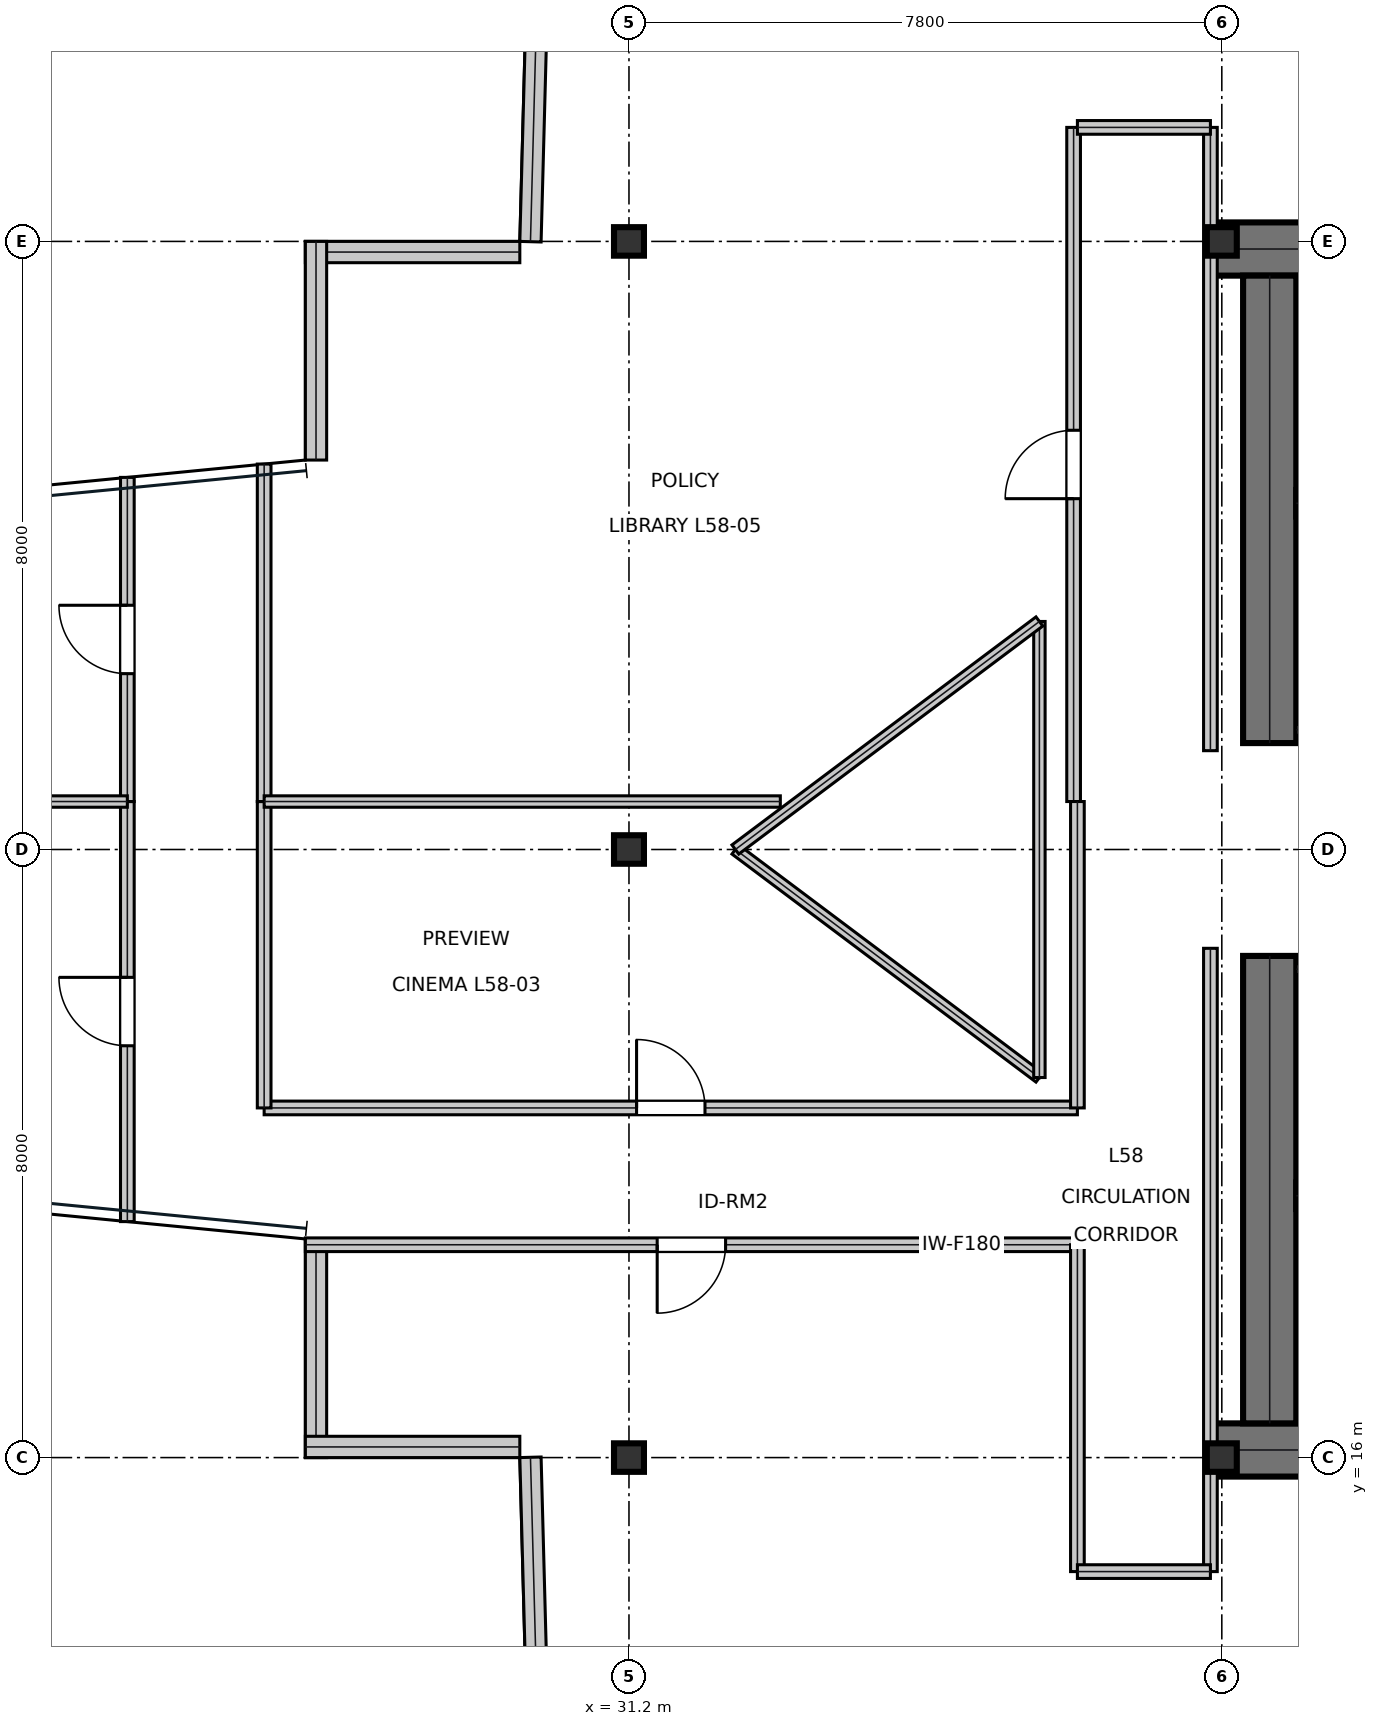
"""IFC4 building model, lengths in metres.
Left out: names, types, materials, properties, quantities, classifications, styles, units other than length and angle.
Written with IfcOpenShell. Run it as: python <this file> out.ifc"""

import sys

from ifc_helpers import new_model, si_unit, direction, frame, frame_2d, origin, origin_2d, place, context, subcontext, project, spatial, rectangle, i_section, extrude, element, fill, save


model = new_model("IFC4")
c1 = context("Model", 3, precision=1e-05, world=origin(), true_north=direction((0.0, 1.0)))
c2 = subcontext(c1, "Body", "Model", "MODEL_VIEW")
j1 = project(units=[si_unit("LENGTHUNIT", "METRE"), si_unit("PLANEANGLEUNIT", "RADIAN")], contexts=[c1])
p1 = place(None, origin())
s1 = spatial("IfcSite", under=j1, at=p1, CompositionType="ELEMENT")
p2 = place(p1, origin())
s2 = spatial("IfcBuilding", under=s1, at=p2, CompositionType="ELEMENT")
p3 = place(p2, frame((0.0, 0.0, 248.55)))
s3 = spatial("IfcBuildingStorey", under=s2, at=p3, CompositionType="ELEMENT", Elevation=248.55)
for number, where, z_axis, x_axis in (
    (1, (38.8, 31.9, 0.0), (0.0, 0.0, 1.0), (1.0, 0.0, 0.0)),
    (2, (38.8, 16.1, 0.0), (0.0, 0.0, 1.0), (1.0, 0.0, 0.0)),
):
    element("IfcWall", number, at=place(p3, frame(where, z_axis=z_axis, x_axis=x_axis)), inside=s3, PredefinedType="SHEAR", context=c2, shape_type="SweptSolid", body=[
        extrude(rectangle(XDim=16.0, YDim=0.7, at=frame_2d((8.0, 0.0))), origin(), (0.0, 0.0, 1.0), 3.79),
    ])
for number, where, z_axis, x_axis in (
    (3, (39.63, 16.45, 0.0), (0.0, 0.0, 1.0), (0.0, 1.0, 0.0)),
    (4, (39.63, 25.4, 0.0), (0.0, 0.0, 1.0), (0.0, 1.0, 0.0)),
):
    element("IfcWall", number, at=place(p3, frame(where, z_axis=z_axis, x_axis=x_axis)), inside=s3, PredefinedType="SHEAR", context=c2, shape_type="SweptSolid", body=[
        extrude(rectangle(XDim=6.15, YDim=0.7, at=frame_2d((3.075, 0.0))), origin(), (0.0, 0.0, 1.0), 3.79),
    ])
p4 = place(p3, frame((39.98, 28.555, 0.0), z_axis=(0.0, 0.0, 1.0), x_axis=(1.0, 0.0, 0.0)))
e5 = element("IfcWall", 5, at=p4, inside=s3, PredefinedType="SHEAR", context=c2, shape_type="SweptSolid", body=[
    extrude(rectangle(XDim=7.71, YDim=0.35, at=frame_2d((3.855, 0.0))), origin(), (0.0, 0.0, 1.0), 3.79),
])
p5 = place(p4, frame((0.25, 0.0, 0.0)))
e6 = element("IfcOpeningElement", 6, at=p5, cuts=e5, PredefinedType="OPENING", context=c2, shape_type="SweptSolid", body=[
    extrude(rectangle(XDim=1.1, YDim=2.15, at=frame_2d((0.55, 1.075))), frame((0.0, 0.185, 0.0), z_axis=(0.0, -1.0, 0.0), x_axis=(1.0, 0.0, 0.0)), (0.0, 0.0, 1.0), 0.37),
])
p6 = place(p3, frame((39.98, 19.445, 0.0), z_axis=(0.0, 0.0, 1.0), x_axis=(1.0, 0.0, 0.0)))
e7 = element("IfcWall", 7, at=p6, inside=s3, PredefinedType="SHEAR", context=c2, shape_type="SweptSolid", body=[
    extrude(rectangle(XDim=7.71, YDim=0.35, at=frame_2d((3.855, 0.0))), origin(), (0.0, 0.0, 1.0), 3.79),
])
p7 = place(p6, frame((0.25, 0.0, 0.0)))
e8 = element("IfcOpeningElement", 8, at=p7, cuts=e7, PredefinedType="OPENING", context=c2, shape_type="SweptSolid", body=[
    extrude(rectangle(XDim=1.1, YDim=2.15, at=frame_2d((0.55, 1.075))), frame((0.0, 0.185, 0.0), z_axis=(0.0, -1.0, 0.0), x_axis=(1.0, 0.0, 0.0)), (0.0, 0.0, 1.0), 0.37),
])
for number, where, z_axis, x_axis in (
    (9, (31.2, 16.0, 0.0), (0.0, 0.0, 1.0), (1.0, 0.0, 0.0)),
    (10, (31.2, 24.0, 0.0), (0.0, 0.0, 1.0), (1.0, 0.0, 0.0)),
    (11, (31.2, 32.0, 0.0), (0.0, 0.0, 1.0), (1.0, 0.0, 0.0)),
    (12, (39.0, 16.0, 0.0), (0.0, 0.0, 1.0), (1.0, 0.0, 0.0)),
    (13, (39.0, 32.0, 0.0), (0.0, 0.0, 1.0), (1.0, 0.0, 0.0)),
):
    element("IfcColumn", number, at=place(p3, frame(where, z_axis=z_axis, x_axis=x_axis)), inside=s3, PredefinedType="COLUMN", context=c2, shape_type="SweptSolid", body=[
        extrude(i_section(OverallWidth=0.394, OverallDepth=0.375, WebThickness=0.017, FlangeThickness=0.028, at=origin_2d()), origin(), (0.0, 0.0, 1.0), 4.044),
    ])
p8 = place(p3, frame((30.083, 38.723, 0.0), z_axis=(0.0, 0.0, 1.0), x_axis=(-0.026702629768, -0.999643421208, 0.0)))
e14 = element("IfcWall", 14, at=p8, inside=s3, PredefinedType="STANDARD", context=c2, shape_type="SweptSolid", body=[
    extrude(rectangle(XDim=6.729, YDim=0.28, at=frame_2d((3.365, 0.0))), origin(), (0.0, 0.0, 1.0), 3.79),
])
p9 = place(p3, frame((29.764, 31.86, 0.0), z_axis=(0.0, 0.0, 1.0), x_axis=(-1.0, 0.0, 0.0)))
e15 = element("IfcWall", 15, at=p9, inside=s3, PredefinedType="STANDARD", context=c2, shape_type="SweptSolid", body=[
    extrude(rectangle(XDim=2.822, YDim=0.28, at=frame_2d((1.411, 0.0))), origin(), (0.0, 0.0, 1.0), 3.79),
])
for number, where, z_axis, x_axis in (
    (16, (27.083, 32.0, 0.0), (0.0, 0.0, 1.0), (0.0, -1.0, 0.0)),
    (17, (27.083, 18.876, 0.0), (0.0, 0.0, 1.0), (0.0, -1.0, 0.0)),
):
    element("IfcWall", number, at=place(p3, frame(where, z_axis=z_axis, x_axis=x_axis)), inside=s3, PredefinedType="STANDARD", context=c2, shape_type="SweptSolid", body=[
        extrude(rectangle(XDim=2.876, YDim=0.28, at=frame_2d((1.438, 0.0))), origin(), (0.0, 0.0, 1.0), 3.319),
    ])
p10 = place(p3, frame((26.942, 16.14, 0.0), z_axis=(0.0, 0.0, 1.0), x_axis=(1.0, 0.0, 0.0)))
e18 = element("IfcWall", 18, at=p10, inside=s3, PredefinedType="STANDARD", context=c2, shape_type="SweptSolid", body=[
    extrude(rectangle(XDim=2.822, YDim=0.28, at=frame_2d((1.411, 0.0))), origin(), (0.0, 0.0, 1.0), 3.79),
])
p11 = place(p3, frame((29.904, 16.004, 0.0), z_axis=(0.0, 0.0, 1.0), x_axis=(0.026702629768, -0.999643421208, 0.0)))
e19 = element("IfcWall", 19, at=p11, inside=s3, PredefinedType="STANDARD", context=c2, shape_type="SweptSolid", body=[
    extrude(rectangle(XDim=6.729, YDim=0.28, at=frame_2d((3.365, 0.0))), origin(), (0.0, 0.0, 1.0), 3.79),
])
p12 = place(p3, frame((39.98, 25.575, 0.0), z_axis=(0.0, 0.0, 1.0), x_axis=(1.0, 0.0, 0.0)))
e20 = element("IfcWall", 20, at=p12, inside=s3, PredefinedType="PARTITIONING", context=c2, shape_type="SweptSolid", body=[
    extrude(rectangle(XDim=5.9, YDim=0.15, at=frame_2d((2.95, 0.0))), origin(), (0.0, 0.0, 1.0), 3.79),
])
p13 = place(p12, frame((2.35, 0.0, 0.0)))
e21 = element("IfcOpeningElement", 21, at=p13, cuts=e20, PredefinedType="OPENING", context=c2, shape_type="SweptSolid", body=[
    extrude(rectangle(XDim=1.05, YDim=2.15, at=frame_2d((0.525, 1.075))), frame((0.0, 0.085, 0.0), z_axis=(0.0, -1.0, 0.0), x_axis=(1.0, 0.0, 0.0)), (0.0, 0.0, 1.0), 0.17),
])
p14 = place(p3, frame((39.98, 22.425, 0.0), z_axis=(0.0, 0.0, 1.0), x_axis=(1.0, 0.0, 0.0)))
e22 = element("IfcWall", 22, at=p14, inside=s3, PredefinedType="PARTITIONING", context=c2, shape_type="SweptSolid", body=[
    extrude(rectangle(XDim=5.9, YDim=0.15, at=frame_2d((2.95, 0.0))), origin(), (0.0, 0.0, 1.0), 3.79),
])
p15 = place(p14, frame((2.35, 0.0, 0.0)))
e23 = element("IfcOpeningElement", 23, at=p15, cuts=e22, PredefinedType="OPENING", context=c2, shape_type="SweptSolid", body=[
    extrude(rectangle(XDim=1.05, YDim=2.15, at=frame_2d((0.525, 1.075))), frame((0.0, 0.085, 0.0), z_axis=(0.0, -1.0, 0.0), x_axis=(1.0, 0.0, 0.0)), (0.0, 0.0, 1.0), 0.17),
])
p16 = place(p3, frame((26.942, 18.8, 0.0), z_axis=(0.0, 0.0, 1.0), x_axis=(1.0, 0.0, 0.0)))
e24 = element("IfcWall", 24, at=p16, inside=s3, PredefinedType="SOLIDWALL", context=c2, shape_type="SweptSolid", body=[
    extrude(rectangle(XDim=10.158, YDim=0.18, at=frame_2d((5.079, 0.0))), origin(), (0.0, 0.0, 1.0), 3.241),
])
p17 = place(p16, frame((4.629, 0.0, 0.0)))
e25 = element("IfcOpeningElement", 25, at=p17, cuts=e24, PredefinedType="OPENING", context=c2, shape_type="SweptSolid", body=[
    extrude(rectangle(XDim=0.9, YDim=2.15, at=frame_2d((0.45, 1.075))), frame((0.0, 0.1, 0.0), z_axis=(0.0, -1.0, 0.0), x_axis=(1.0, 0.0, 0.0)), (0.0, 0.0, 1.0), 0.2),
])
p18 = place(p3, frame((24.6, 19.104, 0.0), z_axis=(0.0, 0.0, 1.0), x_axis=(0.0, 1.0, 0.0)))
e26 = element("IfcWall", 26, at=p18, inside=s3, PredefinedType="SOLIDWALL", context=c2, shape_type="SweptSolid", body=[
    extrude(rectangle(XDim=5.527, YDim=0.18, at=frame_2d((2.763, 0.0))), origin(), (0.0, 0.0, 1.0), 3.241),
])
p19 = place(p18, frame((2.313, 0.0, 0.0)))
e27 = element("IfcOpeningElement", 27, at=p19, cuts=e26, PredefinedType="OPENING", context=c2, shape_type="SweptSolid", body=[
    extrude(rectangle(XDim=0.9, YDim=2.15, at=frame_2d((0.45, 1.075))), frame((0.0, 0.1, 0.0), z_axis=(0.0, -1.0, 0.0), x_axis=(1.0, 0.0, 0.0)), (0.0, 0.0, 1.0), 0.2),
])
p20 = place(p3, frame((26.4, 20.6, 0.0), z_axis=(0.0, 0.0, 1.0), x_axis=(1.0, 0.0, 0.0)))
e28 = element("IfcWall", 28, at=p20, inside=s3, PredefinedType="SOLIDWALL", context=c2, shape_type="SweptSolid", body=[
    extrude(rectangle(XDim=10.7, YDim=0.18, at=frame_2d((5.35, 0.0))), origin(), (0.0, 0.0, 1.0), 3.241),
])
p21 = place(p20, frame((4.9, 0.0, 0.0)))
e29 = element("IfcOpeningElement", 29, at=p21, cuts=e28, PredefinedType="OPENING", context=c2, shape_type="SweptSolid", body=[
    extrude(rectangle(XDim=0.9, YDim=2.15, at=frame_2d((0.45, 1.075))), frame((0.0, 0.1, 0.0), z_axis=(0.0, -1.0, 0.0), x_axis=(1.0, 0.0, 0.0)), (0.0, 0.0, 1.0), 0.2),
])
p22 = place(p3, frame((24.6, 24.631, 0.0), z_axis=(0.0, 0.0, 1.0), x_axis=(0.0, 1.0, 0.0)))
e30 = element("IfcWall", 30, at=p22, inside=s3, PredefinedType="SOLIDWALL", context=c2, shape_type="SweptSolid", body=[
    extrude(rectangle(XDim=4.264, YDim=0.18, at=frame_2d((2.132, 0.0))), origin(), (0.0, 0.0, 1.0), 3.241),
])
p23 = place(p22, frame((1.682, 0.0, 0.0)))
e31 = element("IfcOpeningElement", 31, at=p23, cuts=e30, PredefinedType="OPENING", context=c2, shape_type="SweptSolid", body=[
    extrude(rectangle(XDim=0.9, YDim=2.15, at=frame_2d((0.45, 1.075))), frame((0.0, 0.1, 0.0), z_axis=(0.0, -1.0, 0.0), x_axis=(1.0, 0.0, 0.0)), (0.0, 0.0, 1.0), 0.2),
])
p24 = place(p3, frame((37.05, 24.631, 0.0), z_axis=(0.0, 0.0, 1.0), x_axis=(0.0, 1.0, 0.0)))
e32 = element("IfcWall", 32, at=p24, inside=s3, PredefinedType="SOLIDWALL", context=c2, shape_type="SweptSolid", body=[
    extrude(rectangle(XDim=8.869, YDim=0.18, at=frame_2d((4.435, 0.0))), origin(), (0.0, 0.0, 1.0), 3.241),
])
p25 = place(p24, frame((3.985, 0.0, 0.0)))
e33 = element("IfcOpeningElement", 33, at=p25, cuts=e32, PredefinedType="OPENING", context=c2, shape_type="SweptSolid", body=[
    extrude(rectangle(XDim=0.9, YDim=2.15, at=frame_2d((0.45, 1.075))), frame((0.0, 0.1, 0.0), z_axis=(0.0, -1.0, 0.0), x_axis=(1.0, 0.0, 0.0)), (0.0, 0.0, 1.0), 0.2),
])
p26 = place(p3, frame((38.85, 14.5, 0.0), z_axis=(0.0, 0.0, 1.0), x_axis=(0.0, 1.0, 0.0)))
e34 = element("IfcWall", 34, at=p26, inside=s3, PredefinedType="SOLIDWALL", context=c2, shape_type="SweptSolid", body=[
    extrude(rectangle(XDim=8.2, YDim=0.18, at=frame_2d((4.1, 0.0))), origin(), (0.0, 0.0, 1.0), 3.241),
])
p27 = place(p3, frame((37.1, 14.5, 0.0), z_axis=(0.0, 0.0, 1.0), x_axis=(0.0, 1.0, 0.0)))
e35 = element("IfcWall", 35, at=p27, inside=s3, PredefinedType="SOLIDWALL", context=c2, shape_type="SweptSolid", body=[
    extrude(rectangle(XDim=4.3, YDim=0.18, at=frame_2d((2.15, 0.0))), origin(), (0.0, 0.0, 1.0), 3.241),
])
p28 = place(p3, frame((37.1, 14.5, 0.0), z_axis=(0.0, 0.0, 1.0), x_axis=(1.0, 0.0, 0.0)))
e36 = element("IfcWall", 36, at=p28, inside=s3, PredefinedType="SOLIDWALL", context=c2, shape_type="SweptSolid", body=[
    extrude(rectangle(XDim=1.75, YDim=0.18, at=frame_2d((0.875, 0.0))), origin(), (0.0, 0.0, 1.0), 3.241),
])
p29 = place(p3, frame((26.4, 20.6, 0.0), z_axis=(0.0, 0.0, 1.0), x_axis=(0.0, 1.0, 0.0)))
e37 = element("IfcWall", 37, at=p29, inside=s3, PredefinedType="SOLIDWALL", context=c2, shape_type="SweptSolid", body=[
    extrude(rectangle(XDim=4.031, YDim=0.18, at=frame_2d((2.016, 0.0))), origin(), (0.0, 0.0, 1.0), 3.241),
])
p30 = place(p3, frame((37.1, 20.6, 0.0), z_axis=(0.0, 0.0, 1.0), x_axis=(0.0, 1.0, 0.0)))
e38 = element("IfcWall", 38, at=p30, inside=s3, PredefinedType="SOLIDWALL", context=c2, shape_type="SweptSolid", body=[
    extrude(rectangle(XDim=4.031, YDim=0.18, at=frame_2d((2.016, 0.0))), origin(), (0.0, 0.0, 1.0), 3.79),
])
p31 = place(p3, frame((38.85, 25.3, 0.0), z_axis=(0.0, 0.0, 1.0), x_axis=(0.0, 1.0, 0.0)))
e39 = element("IfcWall", 39, at=p31, inside=s3, PredefinedType="SOLIDWALL", context=c2, shape_type="SweptSolid", body=[
    extrude(rectangle(XDim=8.2, YDim=0.18, at=frame_2d((4.1, 0.0))), origin(), (0.0, 0.0, 1.0), 3.241),
])
p32 = place(p3, frame((26.4, 24.631, 0.0), z_axis=(0.0, 0.0, 1.0), x_axis=(0.0, 1.0, 0.0)))
e40 = element("IfcWall", 40, at=p32, inside=s3, PredefinedType="SOLIDWALL", context=c2, shape_type="SweptSolid", body=[
    extrude(rectangle(XDim=4.44, YDim=0.18, at=frame_2d((2.22, 0.0))), origin(), (0.0, 0.0, 1.0), 3.241),
])
p33 = place(p3, frame((37.1, 33.5, 0.0), z_axis=(0.0, 0.0, 1.0), x_axis=(1.0, 0.0, 0.0)))
e41 = element("IfcWall", 41, at=p33, inside=s3, PredefinedType="SOLIDWALL", context=c2, shape_type="SweptSolid", body=[
    extrude(rectangle(XDim=1.75, YDim=0.18, at=frame_2d((0.875, 0.0))), origin(), (0.0, 0.0, 1.0), 3.241),
])
p34 = place(p3, frame((14.791, 24.631, 0.0), z_axis=(0.0, 0.0, 1.0), x_axis=(1.0, 0.0, 0.0)))
e42 = element("IfcWall", 42, at=p34, inside=s3, PredefinedType="MOVABLE", context=c2, shape_type="SweptSolid", body=[
    extrude(rectangle(XDim=9.809, YDim=0.15, at=frame_2d((4.905, 0.0))), origin(), (0.0, 0.0, 1.0), 3.468),
])
p35 = place(p3, frame((26.4, 24.631, 0.0), z_axis=(0.0, 0.0, 1.0), x_axis=(1.0, 0.0, 0.0)))
e43 = element("IfcWall", 43, at=p35, inside=s3, PredefinedType="MOVABLE", context=c2, shape_type="SweptSolid", body=[
    extrude(rectangle(XDim=6.792, YDim=0.15, at=frame_2d((3.396, 0.0))), origin(), (0.0, 0.0, 1.0), 3.241),
])
p36 = place(p3, frame((32.6, 24.0, 0.0), z_axis=(0.0, 0.0, 1.0), x_axis=(0.8, -0.6, 0.0)))
e44 = element("IfcWall", 44, at=p36, inside=s3, PredefinedType="MOVABLE", context=c2, shape_type="SweptSolid", body=[
    extrude(rectangle(XDim=5.0, YDim=0.15, at=frame_2d((2.5, 0.0))), origin(), (0.0, 0.0, 1.0), 3.79),
])
p37 = place(p3, frame((36.6, 21.0, 0.0), z_axis=(0.0, 0.0, 1.0), x_axis=(0.0, 1.0, 0.0)))
e45 = element("IfcWall", 45, at=p37, inside=s3, PredefinedType="MOVABLE", context=c2, shape_type="SweptSolid", body=[
    extrude(rectangle(XDim=6.0, YDim=0.15, at=frame_2d((3.0, 0.0))), origin(), (0.0, 0.0, 1.0), 3.79),
])
p38 = place(p3, frame((36.6, 27.0, 0.0), z_axis=(0.0, 0.0, 1.0), x_axis=(-0.8, -0.6, 0.0)))
e46 = element("IfcWall", 46, at=p38, inside=s3, PredefinedType="MOVABLE", context=c2, shape_type="SweptSolid", body=[
    extrude(rectangle(XDim=5.0, YDim=0.15, at=frame_2d((2.5, 0.0))), origin(), (0.0, 0.0, 1.0), 3.79),
])
p39 = place(p17, frame((0.9, 0.0, 0.0), z_axis=(0.0, 0.0, 1.0), x_axis=(-1.0, 0.0, 0.0)))
e47 = element("IfcDoor", 47, at=p39, inside=s3, OperationType="SINGLE_SWING_RIGHT", PredefinedType="DOOR", context=c2, shape_type="SweptSolid", body=[
    extrude(rectangle(XDim=0.9, YDim=2.15, at=frame_2d((0.45, 1.075))), frame((0.0, 0.025, 0.0), z_axis=(0.0, -1.0, 0.0), x_axis=(1.0, 0.0, 0.0)), (0.0, 0.0, 1.0), 0.05),
])
fill(e25, e47)
p40 = place(p19, origin())
e48 = element("IfcDoor", 48, at=p40, inside=s3, OperationType="SINGLE_SWING_RIGHT", PredefinedType="DOOR", context=c2, shape_type="SweptSolid", body=[
    extrude(rectangle(XDim=0.9, YDim=2.15, at=frame_2d((0.45, 1.075))), frame((0.0, 0.025, 0.0), z_axis=(0.0, -1.0, 0.0), x_axis=(1.0, 0.0, 0.0)), (0.0, 0.0, 1.0), 0.05),
])
fill(e27, e48)
p41 = place(p21, origin())
e49 = element("IfcDoor", 49, at=p41, inside=s3, OperationType="SINGLE_SWING_LEFT", PredefinedType="DOOR", context=c2, shape_type="SweptSolid", body=[
    extrude(rectangle(XDim=0.9, YDim=2.15, at=frame_2d((0.45, 1.075))), frame((0.0, 0.025, 0.0), z_axis=(0.0, -1.0, 0.0), x_axis=(1.0, 0.0, 0.0)), (0.0, 0.0, 1.0), 0.05),
])
fill(e29, e49)
p42 = place(p23, origin())
e50 = element("IfcDoor", 50, at=p42, inside=s3, OperationType="SINGLE_SWING_RIGHT", PredefinedType="DOOR", context=c2, shape_type="SweptSolid", body=[
    extrude(rectangle(XDim=0.9, YDim=2.15, at=frame_2d((0.45, 1.075))), frame((0.0, 0.025, 0.0), z_axis=(0.0, -1.0, 0.0), x_axis=(1.0, 0.0, 0.0)), (0.0, 0.0, 1.0), 0.05),
])
fill(e31, e50)
p43 = place(p25, origin())
e51 = element("IfcDoor", 51, at=p43, inside=s3, OperationType="SINGLE_SWING_LEFT", PredefinedType="DOOR", context=c2, shape_type="SweptSolid", body=[
    extrude(rectangle(XDim=0.9, YDim=2.15, at=frame_2d((0.45, 1.075))), frame((0.0, 0.025, 0.0), z_axis=(0.0, -1.0, 0.0), x_axis=(1.0, 0.0, 0.0)), (0.0, 0.0, 1.0), 0.05),
])
fill(e33, e51)
save(model, sys.argv[1])
